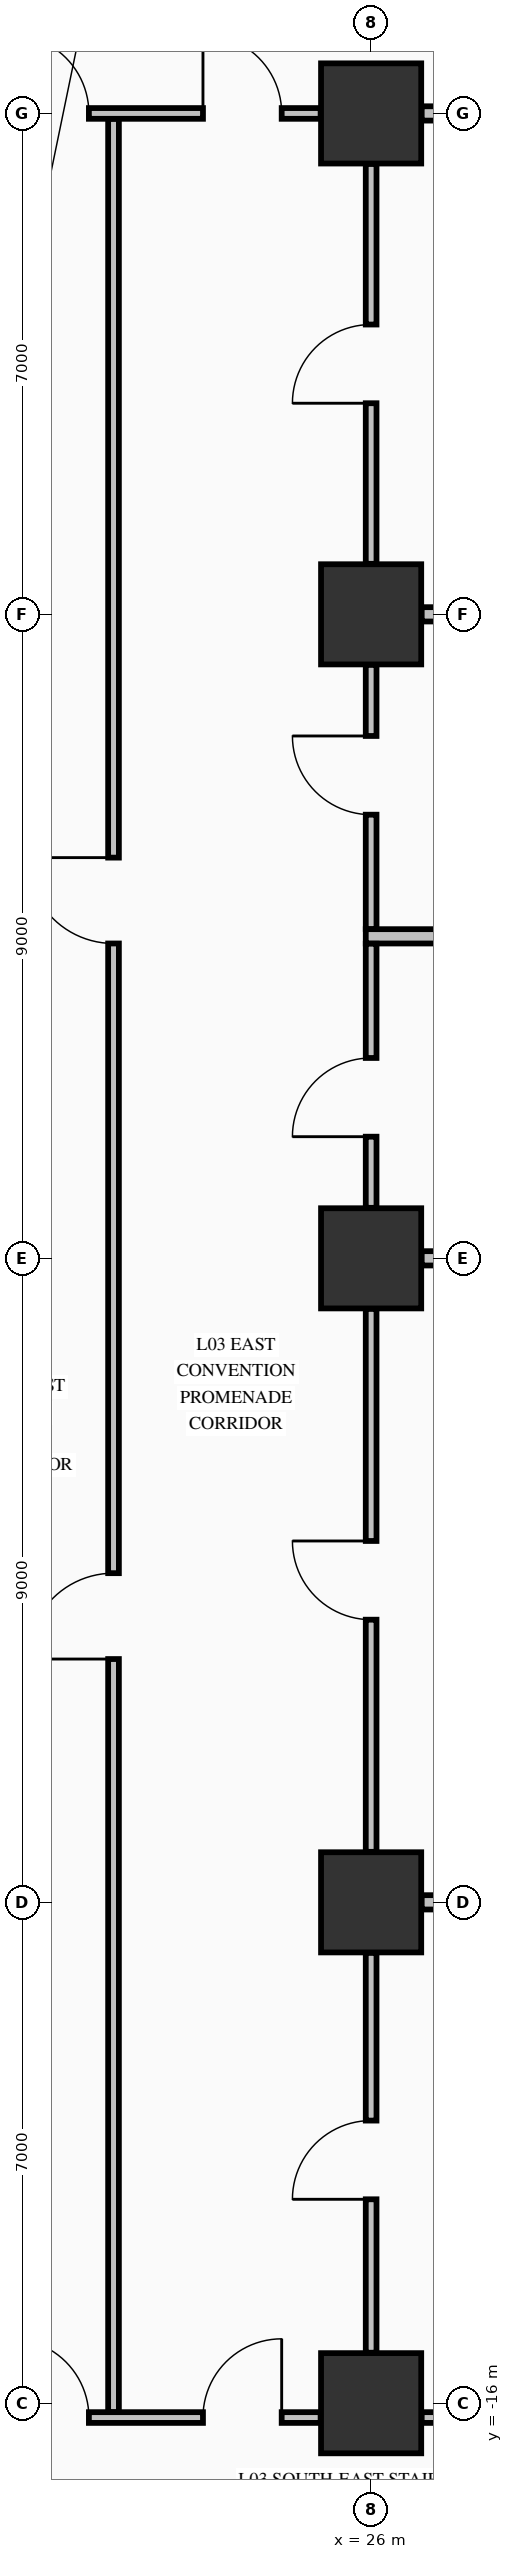
"""IFC4 building model, lengths in metres.
Left out: names, types, materials, properties, quantities, classifications, styles, units other than length and angle.
Written with IfcOpenShell. Run it as: python <this file> out.ifc"""

import sys

from ifc_helpers import new_model, si_unit, direction, frame, frame_2d, origin, origin_2d, place, context, subcontext, project, spatial, rectangle, extrude, element, fill, save


model = new_model("IFC4")
c1 = context("Model", 3, precision=1e-05, world=origin(), true_north=direction((0.0, 1.0)))
c2 = subcontext(c1, "Body", "Model", "MODEL_VIEW")
j1 = project(units=[si_unit("LENGTHUNIT", "METRE"), si_unit("PLANEANGLEUNIT", "RADIAN")], contexts=[c1])
p1 = place(None, origin())
s1 = spatial("IfcSite", under=j1, at=p1, CompositionType="ELEMENT")
p2 = place(p1, origin())
s2 = spatial("IfcBuilding", under=s1, at=p2, CompositionType="ELEMENT")
p3 = place(p2, frame((0.0, 0.0, 16.32)))
s3 = spatial("IfcBuildingStorey", under=s2, at=p3, CompositionType="ELEMENT", Elevation=16.32)
for number, where, z_axis, x_axis in (
    (1, (26.0, -16.0, 0.0), (0.0, 0.0, 1.0), (1.0, 0.0, 0.0)),
    (2, (26.0, -9.0, 0.0), (0.0, 0.0, 1.0), (1.0, 0.0, 0.0)),
    (3, (26.0, 0.0, 0.0), (0.0, 0.0, 1.0), (1.0, 0.0, 0.0)),
    (4, (26.0, 9.0, 0.0), (0.0, 0.0, 1.0), (1.0, 0.0, 0.0)),
    (5, (26.0, 16.0, 0.0), (0.0, 0.0, 1.0), (1.0, 0.0, 0.0)),
):
    element("IfcColumn", number, at=place(p3, frame(where, z_axis=z_axis, x_axis=x_axis)), inside=s3, PredefinedType="COLUMN", context=c2, shape_type="SweptSolid", body=[
        extrude(rectangle(XDim=1.4, YDim=1.4, at=origin_2d()), origin(), (0.0, 0.0, 1.0), 4.99),
    ])
p4 = place(p3, frame((20.806, -16.2, 0.0), z_axis=(0.0, 0.0, 1.0), x_axis=(1.0, 0.0, 0.0)))
e6 = element("IfcWall", 6, at=p4, inside=s3, PredefinedType="PARTITIONING", context=c2, shape_type="SweptSolid", body=[
    extrude(rectangle(XDim=4.488, YDim=0.15, at=frame_2d((2.244, 0.0))), origin(), (0.0, 0.0, 1.0), 3.332),
])
p5 = place(p4, frame((0.15, 0.0, 0.0)))
e7 = element("IfcOpeningElement", 7, at=p5, cuts=e6, PredefinedType="OPENING", context=c2, shape_type="SweptSolid", body=[
    extrude(rectangle(XDim=1.1, YDim=2.15, at=frame_2d((0.55, 1.075))), frame((0.0, 0.085, 0.0), z_axis=(0.0, -1.0, 0.0), x_axis=(1.0, 0.0, 0.0)), (0.0, 0.0, 1.0), 0.17),
])
p6 = place(p4, frame((2.844, 0.0, 0.0)))
e8 = element("IfcOpeningElement", 8, at=p6, cuts=e6, PredefinedType="OPENING", context=c2, shape_type="SweptSolid", body=[
    extrude(rectangle(XDim=1.1, YDim=2.15, at=frame_2d((0.55, 1.075))), frame((0.0, 0.085, 0.0), z_axis=(0.0, -1.0, 0.0), x_axis=(1.0, 0.0, 0.0)), (0.0, 0.0, 1.0), 0.17),
])
p7 = place(p3, frame((26.706, -16.2, 0.0), z_axis=(0.0, 0.0, 1.0), x_axis=(1.0, 0.0, 0.0)))
e9 = element("IfcWall", 9, at=p7, inside=s3, PredefinedType="PARTITIONING", context=c2, shape_type="SweptSolid", body=[
    extrude(rectangle(XDim=2.588, YDim=0.15, at=frame_2d((1.294, 0.0))), origin(), (0.0, 0.0, 1.0), 3.332),
])
for number, where, z_axis, x_axis in (
    (10, (26.706, -9.0, 0.0), (0.0, 0.0, 1.0), (1.0, 0.0, 0.0)),
    (11, (26.706, 0.0, 0.0), (0.0, 0.0, 1.0), (1.0, 0.0, 0.0)),
):
    element("IfcWall", number, at=place(p3, frame(where, z_axis=z_axis, x_axis=x_axis)), inside=s3, PredefinedType="PARTITIONING", context=c2, shape_type="SweptSolid", body=[
        extrude(rectangle(XDim=2.588, YDim=0.2, at=frame_2d((1.294, 0.0))), origin(), (0.0, 0.0, 1.0), 3.332),
    ])
p8 = place(p3, frame((25.925, 4.5, 0.0), z_axis=(0.0, 0.0, 1.0), x_axis=(1.0, 0.0, 0.0)))
e12 = element("IfcWall", 12, at=p8, inside=s3, PredefinedType="PARTITIONING", context=c2, shape_type="SweptSolid", body=[
    extrude(rectangle(XDim=7.91, YDim=0.2, at=frame_2d((3.955, 0.0))), origin(), (0.0, 0.0, 1.0), 4.38),
])
p9 = place(p3, frame((26.706, 9.0, 0.0), z_axis=(0.0, 0.0, 1.0), x_axis=(1.0, 0.0, 0.0)))
e13 = element("IfcWall", 13, at=p9, inside=s3, PredefinedType="PARTITIONING", context=c2, shape_type="SweptSolid", body=[
    extrude(rectangle(XDim=2.588, YDim=0.2, at=frame_2d((1.294, 0.0))), origin(), (0.0, 0.0, 1.0), 3.332),
])
p10 = place(p3, frame((20.806, 16.0, 0.0), z_axis=(0.0, 0.0, 1.0), x_axis=(1.0, 0.0, 0.0)))
e14 = element("IfcWall", 14, at=p10, inside=s3, PredefinedType="PARTITIONING", context=c2, shape_type="SweptSolid", body=[
    extrude(rectangle(XDim=4.488, YDim=0.15, at=frame_2d((2.244, 0.0))), origin(), (0.0, 0.0, 1.0), 3.332),
])
p11 = place(p10, frame((0.15, 0.0, 0.0)))
e15 = element("IfcOpeningElement", 15, at=p11, cuts=e14, PredefinedType="OPENING", context=c2, shape_type="SweptSolid", body=[
    extrude(rectangle(XDim=1.1, YDim=2.15, at=frame_2d((0.55, 1.075))), frame((0.0, 0.085, 0.0), z_axis=(0.0, -1.0, 0.0), x_axis=(1.0, 0.0, 0.0)), (0.0, 0.0, 1.0), 0.17),
])
p12 = place(p10, frame((2.844, 0.0, 0.0)))
e16 = element("IfcOpeningElement", 16, at=p12, cuts=e14, PredefinedType="OPENING", context=c2, shape_type="SweptSolid", body=[
    extrude(rectangle(XDim=1.1, YDim=2.15, at=frame_2d((0.55, 1.075))), frame((0.0, 0.085, 0.0), z_axis=(0.0, -1.0, 0.0), x_axis=(1.0, 0.0, 0.0)), (0.0, 0.0, 1.0), 0.17),
])
p13 = place(p3, frame((26.706, 16.0, 0.0), z_axis=(0.0, 0.0, 1.0), x_axis=(1.0, 0.0, 0.0)))
e17 = element("IfcWall", 17, at=p13, inside=s3, PredefinedType="PARTITIONING", context=c2, shape_type="SweptSolid", body=[
    extrude(rectangle(XDim=2.588, YDim=0.2, at=frame_2d((1.294, 0.0))), origin(), (0.0, 0.0, 1.0), 3.332),
])
p14 = place(p3, frame((22.4, -16.122, 0.0), z_axis=(0.0, 0.0, 1.0), x_axis=(0.0, 1.0, 0.0)))
e18 = element("IfcWall", 18, at=p14, inside=s3, PredefinedType="PARTITIONING", context=c2, shape_type="SweptSolid", body=[
    extrude(rectangle(XDim=32.044, YDim=0.15, at=frame_2d((16.022, 0.0))), origin(), (0.0, 0.0, 1.0), 4.99),
])
p15 = place(p14, frame((10.522, 0.0, 0.0)))
e19 = element("IfcOpeningElement", 19, at=p15, cuts=e18, PredefinedType="OPENING", context=c2, shape_type="SweptSolid", body=[
    extrude(rectangle(XDim=1.2, YDim=2.15, at=frame_2d((0.6, 1.075))), frame((0.0, 0.085, 0.0), z_axis=(0.0, -1.0, 0.0), x_axis=(1.0, 0.0, 0.0)), (0.0, 0.0, 1.0), 0.17),
])
p16 = place(p14, frame((20.522, 0.0, 0.0)))
e20 = element("IfcOpeningElement", 20, at=p16, cuts=e18, PredefinedType="OPENING", context=c2, shape_type="SweptSolid", body=[
    extrude(rectangle(XDim=1.2, YDim=2.15, at=frame_2d((0.6, 1.075))), frame((0.0, 0.085, 0.0), z_axis=(0.0, -1.0, 0.0), x_axis=(1.0, 0.0, 0.0)), (0.0, 0.0, 1.0), 0.17),
])
p17 = place(p3, frame((26.0, -15.294, 0.0), z_axis=(0.0, 0.0, 1.0), x_axis=(0.0, 1.0, 0.0)))
e21 = element("IfcWall", 21, at=p17, inside=s3, PredefinedType="PARTITIONING", context=c2, shape_type="SweptSolid", body=[
    extrude(rectangle(XDim=5.588, YDim=0.15, at=frame_2d((2.794, 0.0))), origin(), (0.0, 0.0, 1.0), 3.332),
])
p18 = place(p17, frame((2.144, 0.0, 0.0)))
e22 = element("IfcOpeningElement", 22, at=p18, cuts=e21, PredefinedType="OPENING", context=c2, shape_type="SweptSolid", body=[
    extrude(rectangle(XDim=1.1, YDim=2.15, at=frame_2d((0.55, 1.075))), frame((0.0, 0.085, 0.0), z_axis=(0.0, -1.0, 0.0), x_axis=(1.0, 0.0, 0.0)), (0.0, 0.0, 1.0), 0.17),
])
p19 = place(p3, frame((26.0, -8.294, 0.0), z_axis=(0.0, 0.0, 1.0), x_axis=(0.0, 1.0, 0.0)))
e23 = element("IfcWall", 23, at=p19, inside=s3, PredefinedType="PARTITIONING", context=c2, shape_type="SweptSolid", body=[
    extrude(rectangle(XDim=7.588, YDim=0.15, at=frame_2d((3.794, 0.0))), origin(), (0.0, 0.0, 1.0), 3.332),
])
p20 = place(p19, frame((3.244, 0.0, 0.0)))
e24 = element("IfcOpeningElement", 24, at=p20, cuts=e23, PredefinedType="OPENING", context=c2, shape_type="SweptSolid", body=[
    extrude(rectangle(XDim=1.1, YDim=2.15, at=frame_2d((0.55, 1.075))), frame((0.0, 0.085, 0.0), z_axis=(0.0, -1.0, 0.0), x_axis=(1.0, 0.0, 0.0)), (0.0, 0.0, 1.0), 0.17),
])
p21 = place(p3, frame((26.0, 0.706, 0.0), z_axis=(0.0, 0.0, 1.0), x_axis=(0.0, 1.0, 0.0)))
e25 = element("IfcWall", 25, at=p21, inside=s3, PredefinedType="PARTITIONING", context=c2, shape_type="SweptSolid", body=[
    extrude(rectangle(XDim=3.691, YDim=0.15, at=frame_2d((1.845, 0.0))), origin(), (0.0, 0.0, 1.0), 3.332),
])
p22 = place(p21, frame((0.994, 0.0, 0.0)))
e26 = element("IfcOpeningElement", 26, at=p22, cuts=e25, PredefinedType="OPENING", context=c2, shape_type="SweptSolid", body=[
    extrude(rectangle(XDim=1.1, YDim=2.15, at=frame_2d((0.55, 1.075))), frame((0.0, 0.085, 0.0), z_axis=(0.0, -1.0, 0.0), x_axis=(1.0, 0.0, 0.0)), (0.0, 0.0, 1.0), 0.17),
])
p23 = place(p3, frame((26.0, 4.603, 0.0), z_axis=(0.0, 0.0, 1.0), x_axis=(0.0, 1.0, 0.0)))
e27 = element("IfcWall", 27, at=p23, inside=s3, PredefinedType="PARTITIONING", context=c2, shape_type="SweptSolid", body=[
    extrude(rectangle(XDim=3.691, YDim=0.15, at=frame_2d((1.845, 0.0))), origin(), (0.0, 0.0, 1.0), 3.332),
])
p24 = place(p23, frame((1.597, 0.0, 0.0)))
e28 = element("IfcOpeningElement", 28, at=p24, cuts=e27, PredefinedType="OPENING", context=c2, shape_type="SweptSolid", body=[
    extrude(rectangle(XDim=1.1, YDim=2.15, at=frame_2d((0.55, 1.075))), frame((0.0, 0.085, 0.0), z_axis=(0.0, -1.0, 0.0), x_axis=(1.0, 0.0, 0.0)), (0.0, 0.0, 1.0), 0.17),
])
p25 = place(p3, frame((26.0, 9.706, 0.0), z_axis=(0.0, 0.0, 1.0), x_axis=(0.0, 1.0, 0.0)))
e29 = element("IfcWall", 29, at=p25, inside=s3, PredefinedType="PARTITIONING", context=c2, shape_type="SweptSolid", body=[
    extrude(rectangle(XDim=5.588, YDim=0.15, at=frame_2d((2.794, 0.0))), origin(), (0.0, 0.0, 1.0), 3.332),
])
p26 = place(p25, frame((2.244, 0.0, 0.0)))
e30 = element("IfcOpeningElement", 30, at=p26, cuts=e29, PredefinedType="OPENING", context=c2, shape_type="SweptSolid", body=[
    extrude(rectangle(XDim=1.1, YDim=2.15, at=frame_2d((0.55, 1.075))), frame((0.0, 0.085, 0.0), z_axis=(0.0, -1.0, 0.0), x_axis=(1.0, 0.0, 0.0)), (0.0, 0.0, 1.0), 0.17),
])
p27 = place(p11, origin())
e31 = element("IfcDoor", 31, at=p27, inside=s3, OperationType="SINGLE_SWING_LEFT", PredefinedType="DOOR", context=c2, shape_type="SweptSolid", body=[
    extrude(rectangle(XDim=1.1, YDim=2.15, at=frame_2d((0.55, 1.075))), frame((0.0, 0.025, 0.0), z_axis=(0.0, -1.0, 0.0), x_axis=(1.0, 0.0, 0.0)), (0.0, 0.0, 1.0), 0.05),
])
fill(e15, e31)
p28 = place(p5, origin())
e32 = element("IfcDoor", 32, at=p28, inside=s3, OperationType="SINGLE_SWING_LEFT", PredefinedType="DOOR", context=c2, shape_type="SweptSolid", body=[
    extrude(rectangle(XDim=1.1, YDim=2.15, at=frame_2d((0.55, 1.075))), frame((0.0, 0.025, 0.0), z_axis=(0.0, -1.0, 0.0), x_axis=(1.0, 0.0, 0.0)), (0.0, 0.0, 1.0), 0.05),
])
fill(e7, e32)
p29 = place(p15, origin())
e33 = element("IfcDoor", 33, at=p29, inside=s3, OperationType="SINGLE_SWING_LEFT", PredefinedType="DOOR", context=c2, shape_type="SweptSolid", body=[
    extrude(rectangle(XDim=1.2, YDim=2.15, at=frame_2d((0.6, 1.075))), frame((0.0, 0.025, 0.0), z_axis=(0.0, -1.0, 0.0), x_axis=(1.0, 0.0, 0.0)), (0.0, 0.0, 1.0), 0.05),
])
fill(e19, e33)
p30 = place(p16, origin())
e34 = element("IfcDoor", 34, at=p30, inside=s3, OperationType="SINGLE_SWING_RIGHT", PredefinedType="DOOR", context=c2, shape_type="SweptSolid", body=[
    extrude(rectangle(XDim=1.2, YDim=2.15, at=frame_2d((0.6, 1.075))), frame((0.0, 0.025, 0.0), z_axis=(0.0, -1.0, 0.0), x_axis=(1.0, 0.0, 0.0)), (0.0, 0.0, 1.0), 0.05),
])
fill(e20, e34)
p31 = place(p12, origin())
e35 = element("IfcDoor", 35, at=p31, inside=s3, OperationType="SINGLE_SWING_LEFT", PredefinedType="DOOR", context=c2, shape_type="SweptSolid", body=[
    extrude(rectangle(XDim=1.1, YDim=2.15, at=frame_2d((0.55, 1.075))), frame((0.0, 0.025, 0.0), z_axis=(0.0, -1.0, 0.0), x_axis=(1.0, 0.0, 0.0)), (0.0, 0.0, 1.0), 0.05),
])
fill(e16, e35)
p32 = place(p6, origin())
e36 = element("IfcDoor", 36, at=p32, inside=s3, OperationType="SINGLE_SWING_RIGHT", PredefinedType="DOOR", context=c2, shape_type="SweptSolid", body=[
    extrude(rectangle(XDim=1.1, YDim=2.15, at=frame_2d((0.55, 1.075))), frame((0.0, 0.025, 0.0), z_axis=(0.0, -1.0, 0.0), x_axis=(1.0, 0.0, 0.0)), (0.0, 0.0, 1.0), 0.05),
])
fill(e8, e36)
p33 = place(p18, origin())
e37 = element("IfcDoor", 37, at=p33, inside=s3, OperationType="SINGLE_SWING_LEFT", PredefinedType="DOOR", context=c2, shape_type="SweptSolid", body=[
    extrude(rectangle(XDim=1.1, YDim=2.15, at=frame_2d((0.55, 1.075))), frame((0.0, 0.025, 0.0), z_axis=(0.0, -1.0, 0.0), x_axis=(1.0, 0.0, 0.0)), (0.0, 0.0, 1.0), 0.05),
])
fill(e22, e37)
p34 = place(p20, origin())
e38 = element("IfcDoor", 38, at=p34, inside=s3, OperationType="SINGLE_SWING_RIGHT", PredefinedType="DOOR", context=c2, shape_type="SweptSolid", body=[
    extrude(rectangle(XDim=1.1, YDim=2.15, at=frame_2d((0.55, 1.075))), frame((0.0, 0.025, 0.0), z_axis=(0.0, -1.0, 0.0), x_axis=(1.0, 0.0, 0.0)), (0.0, 0.0, 1.0), 0.05),
])
fill(e24, e38)
p35 = place(p22, origin())
e39 = element("IfcDoor", 39, at=p35, inside=s3, OperationType="SINGLE_SWING_LEFT", PredefinedType="DOOR", context=c2, shape_type="SweptSolid", body=[
    extrude(rectangle(XDim=1.1, YDim=2.15, at=frame_2d((0.55, 1.075))), frame((0.0, 0.025, 0.0), z_axis=(0.0, -1.0, 0.0), x_axis=(1.0, 0.0, 0.0)), (0.0, 0.0, 1.0), 0.05),
])
fill(e26, e39)
p36 = place(p24, origin())
e40 = element("IfcDoor", 40, at=p36, inside=s3, OperationType="SINGLE_SWING_RIGHT", PredefinedType="DOOR", context=c2, shape_type="SweptSolid", body=[
    extrude(rectangle(XDim=1.1, YDim=2.15, at=frame_2d((0.55, 1.075))), frame((0.0, 0.025, 0.0), z_axis=(0.0, -1.0, 0.0), x_axis=(1.0, 0.0, 0.0)), (0.0, 0.0, 1.0), 0.05),
])
fill(e28, e40)
p37 = place(p26, origin())
e41 = element("IfcDoor", 41, at=p37, inside=s3, OperationType="SINGLE_SWING_LEFT", PredefinedType="DOOR", context=c2, shape_type="SweptSolid", body=[
    extrude(rectangle(XDim=1.1, YDim=2.15, at=frame_2d((0.55, 1.075))), frame((0.0, 0.025, 0.0), z_axis=(0.0, -1.0, 0.0), x_axis=(1.0, 0.0, 0.0)), (0.0, 0.0, 1.0), 0.05),
])
fill(e30, e41)
save(model, sys.argv[1])
